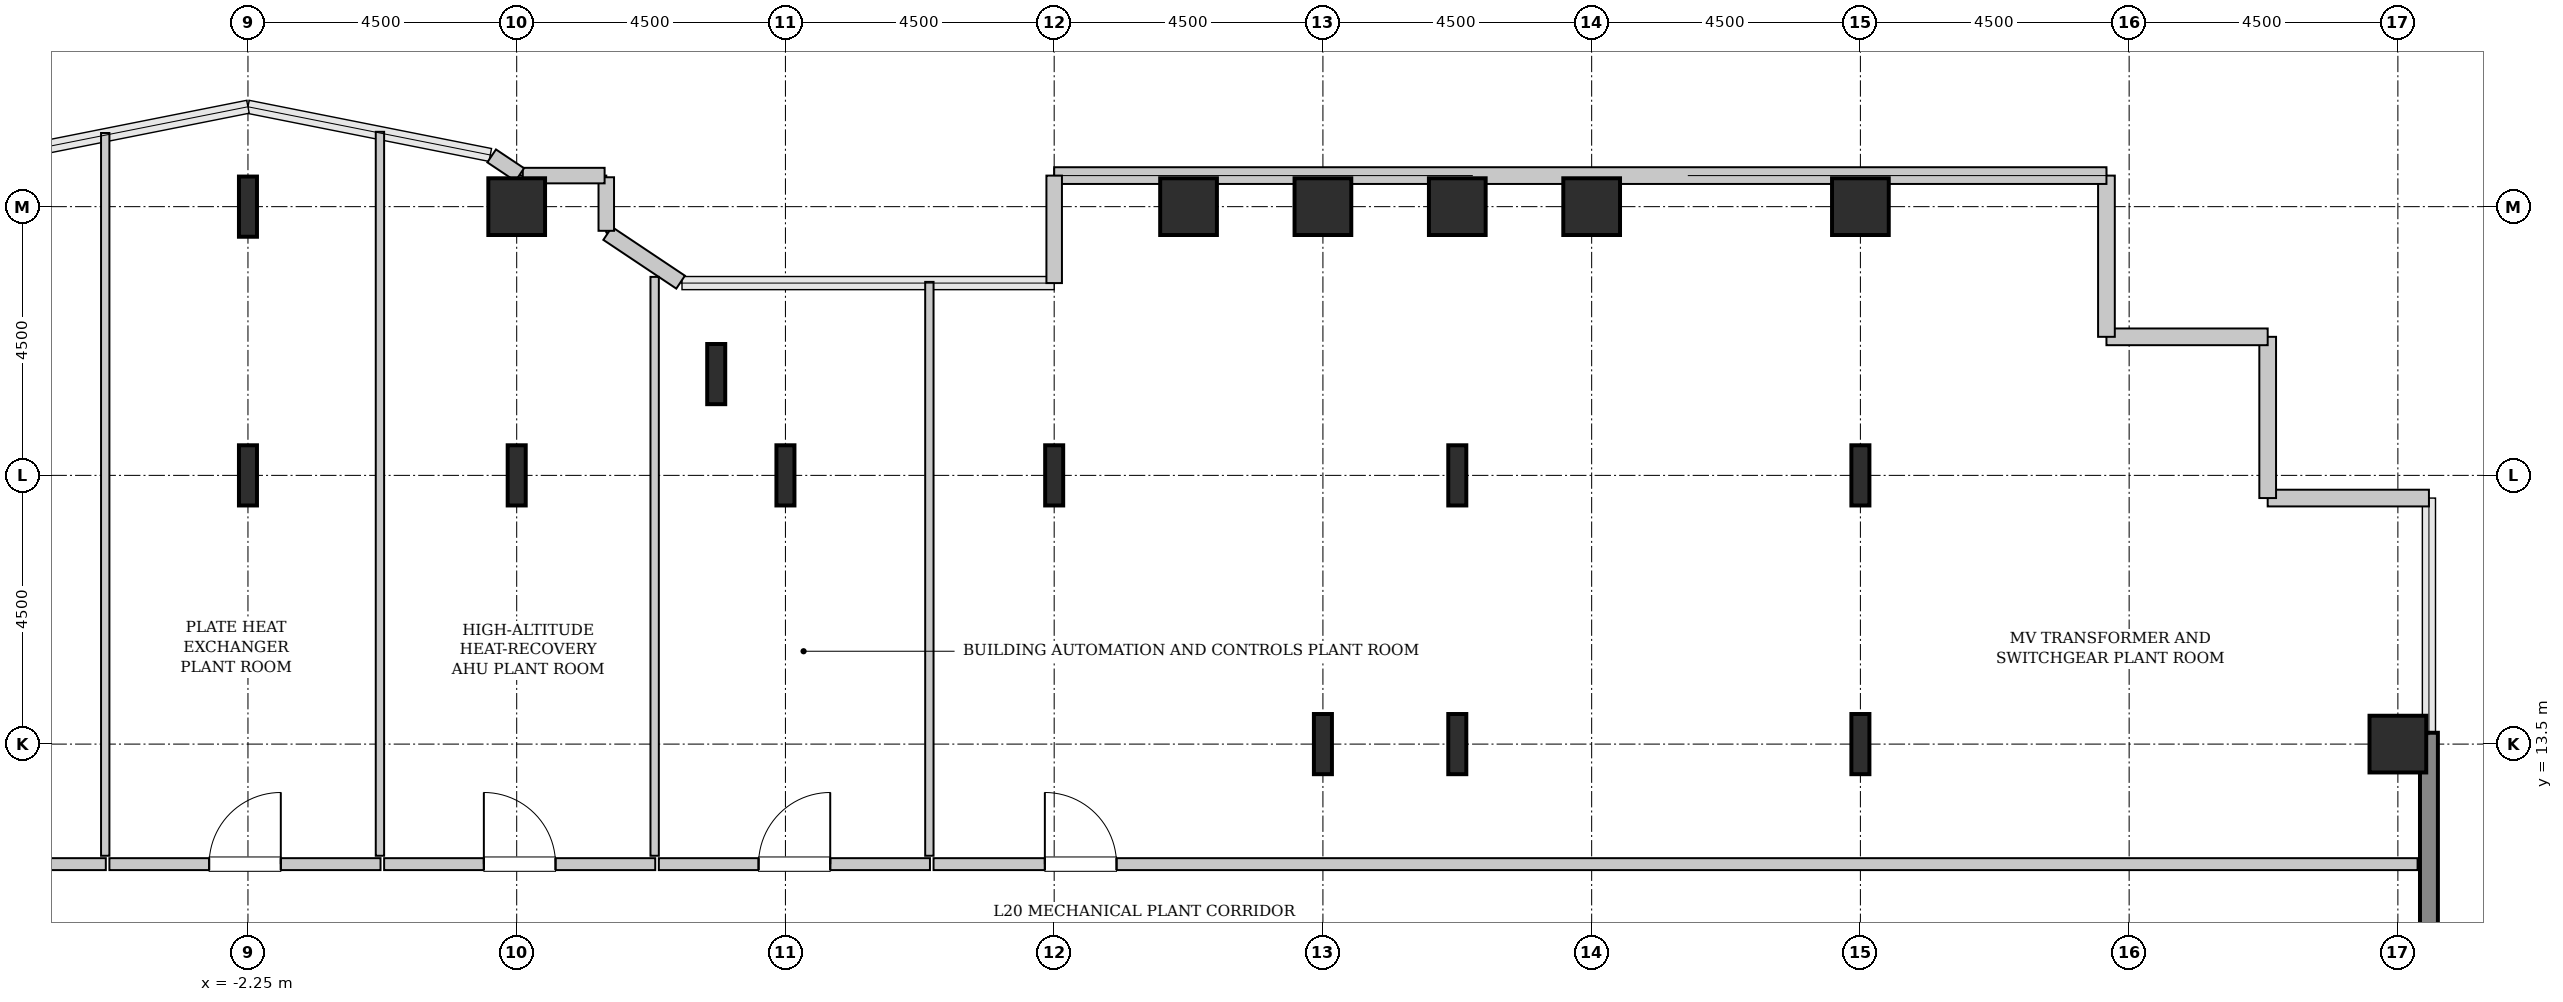
"""IFC4 building model, lengths in metres.
Left out: names, types, materials, properties, quantities, classifications, styles, units other than length and angle.
Written with IfcOpenShell. Run it as: python <this file> out.ifc"""

import sys

from ifc_helpers import new_model, si_unit, direction, frame, frame_2d, origin, origin_2d, place, context, subcontext, project, spatial, rectangle, hollow_rectangle, i_section, extrude, source, transform, mapped, element, fill, save


model = new_model("IFC4")
c1 = context("Model", 3, precision=1e-05, world=origin(), true_north=direction((0.0, 1.0)))
c2 = subcontext(c1, "Body", "Model", "MODEL_VIEW")
j1 = project(units=[si_unit("LENGTHUNIT", "METRE"), si_unit("PLANEANGLEUNIT", "RADIAN")], contexts=[c1])
p1 = place(None, origin())
s1 = spatial("IfcSite", under=j1, at=p1, CompositionType="ELEMENT")
p2 = place(p1, origin())
s2 = spatial("IfcBuilding", under=s1, at=p2, CompositionType="ELEMENT")
p3 = place(p2, frame((0.0, 0.0, 86.2)))
s3 = spatial("IfcBuildingStorey", under=s2, at=p3, CompositionType="ELEMENT", Elevation=86.2)
m1 = source(origin(), c2, "Body", "SweptSolid", [
    extrude(i_section(OverallWidth=0.302, OverallDepth=1.008, WebThickness=0.021, FlangeThickness=0.04, FilletRadius=0.03, at=origin_2d()), origin(), (0.0, 0.0, 1.0), 4.6),
])
for number, where, z_axis, x_axis in (
    (1, (-2.25, 18.0, 0.0), (0.0, 0.0, 1.0), (1.0, 0.0, 0.0)),
    (2, (-2.25, 22.5, 0.0), (0.0, 0.0, 1.0), (1.0, 0.0, 0.0)),
    (3, (2.25, 18.0, 0.0), (0.0, 0.0, 1.0), (1.0, 0.0, 0.0)),
):
    element("IfcColumn", number, at=place(p3, frame(where, z_axis=z_axis, x_axis=x_axis)), inside=s3, PredefinedType="COLUMN", context=c2, shape_type="MappedRepresentation", body=[
        mapped(m1, transform((0.0, 0.0, 0.0), x_axis=(1.0, 0.0, 0.0), y_axis=(0.0, 1.0, 0.0), z_axis=(0.0, 0.0, 1.0), scale=1.0)),
    ])
m2 = source(origin(), c2, "Body", "SweptSolid", [
    extrude(hollow_rectangle(XDim=0.95, YDim=0.95, WallThickness=0.045, InnerFilletRadius=0.045, OuterFilletRadius=0.09, at=origin_2d()), origin(), (0.0, 0.0, 1.0), 4.6),
])
p4 = place(p3, frame((2.25, 22.5, 0.0), z_axis=(0.0, 0.0, 1.0), x_axis=(1.0, 0.0, 0.0)))
e4 = element("IfcColumn", 4, at=p4, inside=s3, PredefinedType="COLUMN", context=c2, shape_type="MappedRepresentation", body=[
    mapped(m2, transform((0.0, 0.0, 0.0), x_axis=(1.0, 0.0, 0.0), y_axis=(0.0, 1.0, 0.0), z_axis=(0.0, 0.0, 1.0), scale=1.0)),
])
for number, where, z_axis, x_axis in (
    (5, (5.591, 19.696, 0.0), (0.0, 0.0, 1.0), (1.0, 0.0, 0.0)),
    (6, (6.75, 18.0, 0.0), (0.0, 0.0, 1.0), (1.0, 0.0, 0.0)),
    (7, (11.25, 18.0, 0.0), (0.0, 0.0, 1.0), (1.0, 0.0, 0.0)),
):
    element("IfcColumn", number, at=place(p3, frame(where, z_axis=z_axis, x_axis=x_axis)), inside=s3, PredefinedType="COLUMN", context=c2, shape_type="MappedRepresentation", body=[
        mapped(m1, transform((0.0, 0.0, 0.0), x_axis=(1.0, 0.0, 0.0), y_axis=(0.0, 1.0, 0.0), z_axis=(0.0, 0.0, 1.0), scale=1.0)),
    ])
p5 = place(p3, frame((13.5, 22.5, 0.0), z_axis=(0.0, 0.0, 1.0), x_axis=(1.0, 0.0, 0.0)))
e8 = element("IfcColumn", 8, at=p5, inside=s3, PredefinedType="COLUMN", context=c2, shape_type="MappedRepresentation", body=[
    mapped(m2, transform((0.0, 0.0, 0.0), x_axis=(1.0, 0.0, 0.0), y_axis=(0.0, 1.0, 0.0), z_axis=(0.0, 0.0, 1.0), scale=1.0)),
])
p6 = place(p3, frame((15.75, 13.5, 0.0), z_axis=(0.0, 0.0, 1.0), x_axis=(1.0, 0.0, 0.0)))
e9 = element("IfcColumn", 9, at=p6, inside=s3, PredefinedType="COLUMN", context=c2, shape_type="MappedRepresentation", body=[
    mapped(m1, transform((0.0, 0.0, 0.0), x_axis=(1.0, 0.0, 0.0), y_axis=(0.0, 1.0, 0.0), z_axis=(0.0, 0.0, 1.0), scale=1.0)),
])
p7 = place(p3, frame((15.75, 22.5, 0.0), z_axis=(0.0, 0.0, 1.0), x_axis=(1.0, 0.0, 0.0)))
e10 = element("IfcColumn", 10, at=p7, inside=s3, PredefinedType="COLUMN", context=c2, shape_type="MappedRepresentation", body=[
    mapped(m2, transform((0.0, 0.0, 0.0), x_axis=(1.0, 0.0, 0.0), y_axis=(0.0, 1.0, 0.0), z_axis=(0.0, 0.0, 1.0), scale=1.0)),
])
for number, where, z_axis, x_axis in (
    (11, (18.0, 13.5, 0.0), (0.0, 0.0, 1.0), (1.0, 0.0, 0.0)),
    (12, (18.0, 18.0, 0.0), (0.0, 0.0, 1.0), (1.0, 0.0, 0.0)),
):
    element("IfcColumn", number, at=place(p3, frame(where, z_axis=z_axis, x_axis=x_axis)), inside=s3, PredefinedType="COLUMN", context=c2, shape_type="MappedRepresentation", body=[
        mapped(m1, transform((0.0, 0.0, 0.0), x_axis=(1.0, 0.0, 0.0), y_axis=(0.0, 1.0, 0.0), z_axis=(0.0, 0.0, 1.0), scale=1.0)),
    ])
for number, where, z_axis, x_axis in (
    (13, (18.0, 22.5, 0.0), (0.0, 0.0, 1.0), (1.0, 0.0, 0.0)),
    (14, (20.25, 22.5, 0.0), (0.0, 0.0, 1.0), (1.0, 0.0, 0.0)),
):
    element("IfcColumn", number, at=place(p3, frame(where, z_axis=z_axis, x_axis=x_axis)), inside=s3, PredefinedType="COLUMN", context=c2, shape_type="MappedRepresentation", body=[
        mapped(m2, transform((0.0, 0.0, 0.0), x_axis=(1.0, 0.0, 0.0), y_axis=(0.0, 1.0, 0.0), z_axis=(0.0, 0.0, 1.0), scale=1.0)),
    ])
for number, where, z_axis, x_axis in (
    (15, (24.75, 13.5, 0.0), (0.0, 0.0, 1.0), (1.0, 0.0, 0.0)),
    (16, (24.75, 18.0, 0.0), (0.0, 0.0, 1.0), (1.0, 0.0, 0.0)),
):
    element("IfcColumn", number, at=place(p3, frame(where, z_axis=z_axis, x_axis=x_axis)), inside=s3, PredefinedType="COLUMN", context=c2, shape_type="MappedRepresentation", body=[
        mapped(m1, transform((0.0, 0.0, 0.0), x_axis=(1.0, 0.0, 0.0), y_axis=(0.0, 1.0, 0.0), z_axis=(0.0, 0.0, 1.0), scale=1.0)),
    ])
for number, where, z_axis, x_axis in (
    (17, (24.75, 22.5, 0.0), (0.0, 0.0, 1.0), (1.0, 0.0, 0.0)),
    (18, (33.75, 13.5, 0.0), (0.0, 0.0, 1.0), (1.0, 0.0, 0.0)),
):
    element("IfcColumn", number, at=place(p3, frame(where, z_axis=z_axis, x_axis=x_axis)), inside=s3, PredefinedType="COLUMN", context=c2, shape_type="MappedRepresentation", body=[
        mapped(m2, transform((0.0, 0.0, 0.0), x_axis=(1.0, 0.0, 0.0), y_axis=(0.0, 1.0, 0.0), z_axis=(0.0, 0.0, 1.0), scale=1.0)),
    ])
m3 = source(origin(), c2, "Body", "SweptSolid", [
    extrude(rectangle(XDim=9.38, YDim=0.3, at=frame_2d((4.69, 0.0))), origin(), (0.0, 0.0, 1.0), 4.35),
])
p8 = place(p3, frame((34.27, 4.31, 0.0), z_axis=(0.0, 0.0, 1.0), x_axis=(0.0, 1.0, 0.0)))
e19 = element("IfcWall", 19, at=p8, inside=s3, PredefinedType="SHEAR", context=c2, shape_type="MappedRepresentation", body=[
    mapped(m3, transform((0.0, 0.0, 0.0), x_axis=(1.0, 0.0, 0.0), y_axis=(0.0, 1.0, 0.0), z_axis=(0.0, 0.0, 1.0), scale=1.0)),
])
m4 = source(origin(), c2, "Body", "SweptSolid", [
    extrude(rectangle(XDim=2.7, YDim=0.28, at=frame_2d((1.35, 0.0))), origin(), (0.0, 0.0, 1.0), 4.35),
])
for number, where, z_axis, x_axis in (
    (20, (34.27, 17.62, 0.0), (0.0, 0.0, 1.0), (-1.0, 0.0, 0.0)),
    (21, (31.57, 17.62, 0.0), (0.0, 0.0, 1.0), (0.0, 1.0, 0.0)),
    (22, (31.57, 20.32, 0.0), (0.0, 0.0, 1.0), (-1.0, 0.0, 0.0)),
    (23, (28.87, 20.32, 0.0), (0.0, 0.0, 1.0), (0.0, 1.0, 0.0)),
):
    element("IfcWall", number, at=place(p3, frame(where, z_axis=z_axis, x_axis=x_axis)), inside=s3, PredefinedType="SOLIDWALL", context=c2, shape_type="MappedRepresentation", body=[
        mapped(m4, transform((0.0, 0.0, 0.0), x_axis=(1.0, 0.0, 0.0), y_axis=(0.0, 1.0, 0.0), z_axis=(0.0, 0.0, 1.0), scale=1.0)),
    ])
m5 = source(origin(), c2, "Body", "SweptSolid", [
    extrude(rectangle(XDim=17.62, YDim=0.28, at=frame_2d((8.81, 0.0))), origin(), (0.0, 0.0, 1.0), 1.1),
])
p9 = place(p3, frame((28.87, 23.02, 0.0), z_axis=(0.0, 0.0, 1.0), x_axis=(-1.0, 0.0, 0.0)))
e24 = element("IfcWall", 24, at=p9, inside=s3, PredefinedType="SOLIDWALL", context=c2, shape_type="MappedRepresentation", body=[
    mapped(m5, transform((0.0, 0.0, 0.0), x_axis=(1.0, 0.0, 0.0), y_axis=(0.0, 1.0, 0.0), z_axis=(0.0, 0.0, 1.0), scale=1.0)),
])
m6 = source(origin(), c2, "Body", "SweptSolid", [
    extrude(rectangle(XDim=1.8, YDim=0.26, at=frame_2d((0.9, 0.0))), origin(), (0.0, 0.0, 1.0), 4.35),
])
p10 = place(p3, frame((11.25, 23.02, 0.0), z_axis=(0.0, 0.0, 1.0), x_axis=(0.0, -1.0, 0.0)))
e25 = element("IfcWall", 25, at=p10, inside=s3, PredefinedType="SOLIDWALL", context=c2, shape_type="MappedRepresentation", body=[
    mapped(m6, transform((0.0, 0.0, 0.0), x_axis=(1.0, 0.0, 0.0), y_axis=(0.0, 1.0, 0.0), z_axis=(0.0, 0.0, 1.0), scale=1.0)),
])
m7 = source(origin(), c2, "Body", "SweptSolid", [
    extrude(rectangle(XDim=1.469, YDim=0.26, at=frame_2d((0.734, 0.0))), origin(), (0.0, 0.0, 1.0), 4.35),
])
p11 = place(p3, frame((4.995, 21.236, 0.0), z_axis=(0.0, 0.0, 1.0), x_axis=(-0.831461760506, 0.555581983884, 0.0)))
e26 = element("IfcWall", 26, at=p11, inside=s3, PredefinedType="SOLIDWALL", context=c2, shape_type="MappedRepresentation", body=[
    mapped(m7, transform((0.0, 0.0, 0.0), x_axis=(1.0, 0.0, 0.0), y_axis=(0.0, 1.0, 0.0), z_axis=(0.0, 0.0, 1.0), scale=1.0)),
])
m8 = source(origin(), c2, "Body", "SweptSolid", [
    extrude(rectangle(XDim=0.897, YDim=0.26, at=frame_2d((0.448, 0.0))), origin(), (0.0, 0.0, 1.0), 4.35),
])
p12 = place(p3, frame((3.75, 22.095, 0.0), z_axis=(0.0, 0.0, 1.0), x_axis=(0.0, 1.0, 0.0)))
e27 = element("IfcWall", 27, at=p12, inside=s3, PredefinedType="SOLIDWALL", context=c2, shape_type="MappedRepresentation", body=[
    mapped(m8, transform((0.0, 0.0, 0.0), x_axis=(1.0, 0.0, 0.0), y_axis=(0.0, 1.0, 0.0), z_axis=(0.0, 0.0, 1.0), scale=1.0)),
])
m9 = source(origin(), c2, "Body", "SweptSolid", [
    extrude(rectangle(XDim=1.37, YDim=0.26, at=frame_2d((0.685, 0.0))), origin(), (0.0, 0.0, 1.0), 4.35),
])
p13 = place(p3, frame((3.722, 23.02, 0.0), z_axis=(0.0, 0.0, 1.0), x_axis=(-1.0, 0.0, 0.0)))
e28 = element("IfcWall", 28, at=p13, inside=s3, PredefinedType="SOLIDWALL", context=c2, shape_type="MappedRepresentation", body=[
    mapped(m9, transform((0.0, 0.0, 0.0), x_axis=(1.0, 0.0, 0.0), y_axis=(0.0, 1.0, 0.0), z_axis=(0.0, 0.0, 1.0), scale=1.0)),
])
m10 = source(origin(), c2, "Body", "SweptSolid", [
    extrude(rectangle(XDim=0.565, YDim=0.26, at=frame_2d((0.283, 0.0))), origin(), (0.0, 0.0, 1.0), 4.35),
])
p14 = place(p3, frame((2.301, 23.036, 0.0), z_axis=(0.0, 0.0, 1.0), x_axis=(-0.831651492666, 0.555297933317, 0.0)))
e29 = element("IfcWall", 29, at=p14, inside=s3, PredefinedType="SOLIDWALL", context=c2, shape_type="MappedRepresentation", body=[
    mapped(m10, transform((0.0, 0.0, 0.0), x_axis=(1.0, 0.0, 0.0), y_axis=(0.0, 1.0, 0.0), z_axis=(0.0, 0.0, 1.0), scale=1.0)),
])
m11 = source(origin(), c2, "Body", "SweptSolid", [
    extrude(rectangle(XDim=4.54, YDim=0.2, at=frame_2d((2.27, 0.0))), origin(), (0.0, 0.0, 1.0), 4.335),
])
p15 = place(p3, frame((-9.17, 11.49, 0.0), z_axis=(0.0, 0.0, 1.0), x_axis=(1.0, 0.0, 0.0)))
e30 = element("IfcWall", 30, at=p15, inside=s3, PredefinedType="SOLIDWALL", context=c2, shape_type="MappedRepresentation", body=[
    mapped(m11, transform((0.0, 0.0, 0.0), x_axis=(1.0, 0.0, 0.0), y_axis=(0.0, 1.0, 0.0), z_axis=(0.0, 0.0, 1.0), scale=1.0)),
])
p16 = place(p15, frame((1.67, 0.0, 0.0)))
e31 = element("IfcOpeningElement", 31, at=p16, cuts=e30, PredefinedType="OPENING", context=c2, shape_type="SweptSolid", body=[
    extrude(rectangle(XDim=1.2, YDim=2.15, at=frame_2d((0.6, 1.075))), frame((0.0, 0.11, 0.0), z_axis=(0.0, -1.0, 0.0), x_axis=(1.0, 0.0, 0.0)), (0.0, 0.0, 1.0), 0.22),
])
m12 = source(origin(), c2, "Body", "SweptSolid", [
    extrude(rectangle(XDim=12.104, YDim=0.14, at=frame_2d((6.052, 0.0))), origin(), (0.0, 0.0, 1.0), 4.335),
])
p17 = place(p3, frame((-4.64, 11.63, 0.0), z_axis=(0.0, 0.0, 1.0), x_axis=(0.0, 1.0, 0.0)))
e32 = element("IfcWall", 32, at=p17, inside=s3, PredefinedType="PARTITIONING", context=c2, shape_type="MappedRepresentation", body=[
    mapped(m12, transform((0.0, 0.0, 0.0), x_axis=(1.0, 0.0, 0.0), y_axis=(0.0, 1.0, 0.0), z_axis=(0.0, 0.0, 1.0), scale=1.0)),
])
p18 = place(p3, frame((-4.57, 11.49, 0.0), z_axis=(0.0, 0.0, 1.0), x_axis=(1.0, 0.0, 0.0)))
e33 = element("IfcWall", 33, at=p18, inside=s3, PredefinedType="SOLIDWALL", context=c2, shape_type="MappedRepresentation", body=[
    mapped(m11, transform((0.0, 0.0, 0.0), x_axis=(1.0, 0.0, 0.0), y_axis=(0.0, 1.0, 0.0), z_axis=(0.0, 0.0, 1.0), scale=1.0)),
])
p19 = place(p18, frame((1.67, 0.0, 0.0)))
e34 = element("IfcOpeningElement", 34, at=p19, cuts=e33, PredefinedType="OPENING", context=c2, shape_type="SweptSolid", body=[
    extrude(rectangle(XDim=1.2, YDim=2.15, at=frame_2d((0.6, 1.075))), frame((0.0, 0.11, 0.0), z_axis=(0.0, -1.0, 0.0), x_axis=(1.0, 0.0, 0.0)), (0.0, 0.0, 1.0), 0.22),
])
m13 = source(origin(), c2, "Body", "SweptSolid", [
    extrude(rectangle(XDim=12.123, YDim=0.14, at=frame_2d((6.062, 0.0))), origin(), (0.0, 0.0, 1.0), 4.335),
])
p20 = place(p3, frame((-0.04, 11.63, 0.0), z_axis=(0.0, 0.0, 1.0), x_axis=(0.0, 1.0, 0.0)))
e35 = element("IfcWall", 35, at=p20, inside=s3, PredefinedType="PARTITIONING", context=c2, shape_type="MappedRepresentation", body=[
    mapped(m13, transform((0.0, 0.0, 0.0), x_axis=(1.0, 0.0, 0.0), y_axis=(0.0, 1.0, 0.0), z_axis=(0.0, 0.0, 1.0), scale=1.0)),
])
p21 = place(p3, frame((0.03, 11.49, 0.0), z_axis=(0.0, 0.0, 1.0), x_axis=(1.0, 0.0, 0.0)))
e36 = element("IfcWall", 36, at=p21, inside=s3, PredefinedType="SOLIDWALL", context=c2, shape_type="MappedRepresentation", body=[
    mapped(m11, transform((0.0, 0.0, 0.0), x_axis=(1.0, 0.0, 0.0), y_axis=(0.0, 1.0, 0.0), z_axis=(0.0, 0.0, 1.0), scale=1.0)),
])
p22 = place(p21, frame((1.67, 0.0, 0.0)))
e37 = element("IfcOpeningElement", 37, at=p22, cuts=e36, PredefinedType="OPENING", context=c2, shape_type="SweptSolid", body=[
    extrude(rectangle(XDim=1.2, YDim=2.15, at=frame_2d((0.6, 1.075))), frame((0.0, 0.11, 0.0), z_axis=(0.0, -1.0, 0.0), x_axis=(1.0, 0.0, 0.0)), (0.0, 0.0, 1.0), 0.22),
])
m14 = source(origin(), c2, "Body", "SweptSolid", [
    extrude(rectangle(XDim=9.694, YDim=0.14, at=frame_2d((4.847, 0.0))), origin(), (0.0, 0.0, 1.0), 4.335),
])
p23 = place(p3, frame((4.56, 11.63, 0.0), z_axis=(0.0, 0.0, 1.0), x_axis=(0.0, 1.0, 0.0)))
e38 = element("IfcWall", 38, at=p23, inside=s3, PredefinedType="PARTITIONING", context=c2, shape_type="MappedRepresentation", body=[
    mapped(m14, transform((0.0, 0.0, 0.0), x_axis=(1.0, 0.0, 0.0), y_axis=(0.0, 1.0, 0.0), z_axis=(0.0, 0.0, 1.0), scale=1.0)),
])
p24 = place(p3, frame((4.63, 11.49, 0.0), z_axis=(0.0, 0.0, 1.0), x_axis=(1.0, 0.0, 0.0)))
e39 = element("IfcWall", 39, at=p24, inside=s3, PredefinedType="SOLIDWALL", context=c2, shape_type="MappedRepresentation", body=[
    mapped(m11, transform((0.0, 0.0, 0.0), x_axis=(1.0, 0.0, 0.0), y_axis=(0.0, 1.0, 0.0), z_axis=(0.0, 0.0, 1.0), scale=1.0)),
])
p25 = place(p24, frame((1.67, 0.0, 0.0)))
e40 = element("IfcOpeningElement", 40, at=p25, cuts=e39, PredefinedType="OPENING", context=c2, shape_type="SweptSolid", body=[
    extrude(rectangle(XDim=1.2, YDim=2.15, at=frame_2d((0.6, 1.075))), frame((0.0, 0.11, 0.0), z_axis=(0.0, -1.0, 0.0), x_axis=(1.0, 0.0, 0.0)), (0.0, 0.0, 1.0), 0.22),
])
m15 = source(origin(), c2, "Body", "SweptSolid", [
    extrude(rectangle(XDim=9.61, YDim=0.14, at=frame_2d((4.805, 0.0))), origin(), (0.0, 0.0, 1.0), 4.335),
])
p26 = place(p3, frame((9.16, 11.63, 0.0), z_axis=(0.0, 0.0, 1.0), x_axis=(0.0, 1.0, 0.0)))
e41 = element("IfcWall", 41, at=p26, inside=s3, PredefinedType="PARTITIONING", context=c2, shape_type="MappedRepresentation", body=[
    mapped(m15, transform((0.0, 0.0, 0.0), x_axis=(1.0, 0.0, 0.0), y_axis=(0.0, 1.0, 0.0), z_axis=(0.0, 0.0, 1.0), scale=1.0)),
])
m16 = source(origin(), c2, "Body", "SweptSolid", [
    extrude(rectangle(XDim=24.85, YDim=0.2, at=frame_2d((12.425, 0.0))), origin(), (0.0, 0.0, 1.0), 4.335),
])
p27 = place(p3, frame((9.23, 11.49, 0.0), z_axis=(0.0, 0.0, 1.0), x_axis=(1.0, 0.0, 0.0)))
e42 = element("IfcWall", 42, at=p27, inside=s3, PredefinedType="SOLIDWALL", context=c2, shape_type="MappedRepresentation", body=[
    mapped(m16, transform((0.0, 0.0, 0.0), x_axis=(1.0, 0.0, 0.0), y_axis=(0.0, 1.0, 0.0), z_axis=(0.0, 0.0, 1.0), scale=1.0)),
])
p28 = place(p27, frame((1.864, 0.0, 0.0)))
e43 = element("IfcOpeningElement", 43, at=p28, cuts=e42, PredefinedType="OPENING", context=c2, shape_type="SweptSolid", body=[
    extrude(rectangle(XDim=1.2, YDim=2.15, at=frame_2d((0.6, 1.075))), frame((0.0, 0.11, 0.0), z_axis=(0.0, -1.0, 0.0), x_axis=(1.0, 0.0, 0.0)), (0.0, 0.0, 1.0), 0.22),
])
m17 = source(origin(), c2, "Body", "SweptSolid", [
    extrude(rectangle(XDim=1.2, YDim=2.15, at=frame_2d((0.6, 1.075))), frame((0.0, 0.025, 0.0), z_axis=(0.0, -1.0, 0.0), x_axis=(1.0, 0.0, 0.0)), (0.0, 0.0, 1.0), 0.05),
])
p29 = place(p19, origin())
e44 = element("IfcDoor", 44, at=p29, inside=s3, OperationType="SINGLE_SWING_RIGHT", PredefinedType="DOOR", context=c2, shape_type="MappedRepresentation", body=[
    mapped(m17, transform((0.0, 0.0, 0.0), x_axis=(1.0, 0.0, 0.0), y_axis=(0.0, 1.0, 0.0), z_axis=(0.0, 0.0, 1.0), scale=1.0)),
])
fill(e34, e44)
p30 = place(p22, origin())
e45 = element("IfcDoor", 45, at=p30, inside=s3, OperationType="SINGLE_SWING_LEFT", PredefinedType="DOOR", context=c2, shape_type="MappedRepresentation", body=[
    mapped(m17, transform((0.0, 0.0, 0.0), x_axis=(1.0, 0.0, 0.0), y_axis=(0.0, 1.0, 0.0), z_axis=(0.0, 0.0, 1.0), scale=1.0)),
])
fill(e37, e45)
p31 = place(p25, origin())
e46 = element("IfcDoor", 46, at=p31, inside=s3, OperationType="SINGLE_SWING_RIGHT", PredefinedType="DOOR", context=c2, shape_type="MappedRepresentation", body=[
    mapped(m17, transform((0.0, 0.0, 0.0), x_axis=(1.0, 0.0, 0.0), y_axis=(0.0, 1.0, 0.0), z_axis=(0.0, 0.0, 1.0), scale=1.0)),
])
fill(e40, e46)
p32 = place(p28, origin())
e47 = element("IfcDoor", 47, at=p32, inside=s3, OperationType="SINGLE_SWING_LEFT", PredefinedType="DOOR", context=c2, shape_type="MappedRepresentation", body=[
    mapped(m17, transform((0.0, 0.0, 0.0), x_axis=(1.0, 0.0, 0.0), y_axis=(0.0, 1.0, 0.0), z_axis=(0.0, 0.0, 1.0), scale=1.0)),
])
fill(e43, e47)
save(model, sys.argv[1])
